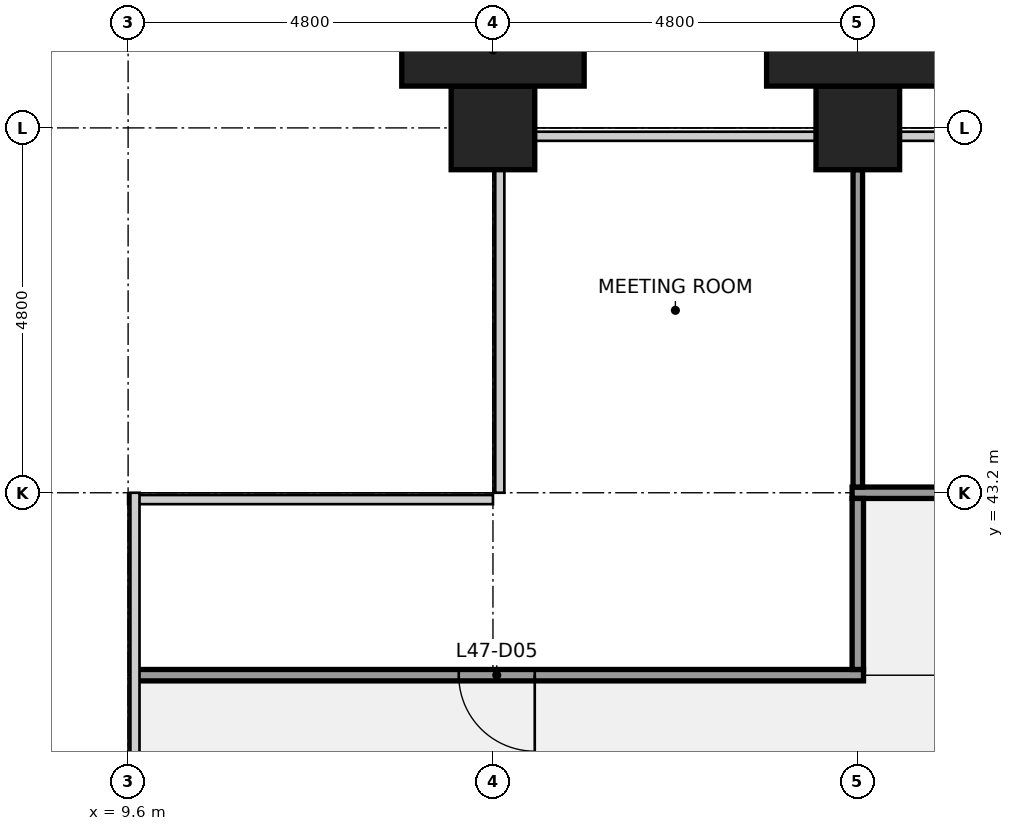
"""IFC4 building model, lengths in metres.
Left out: names, types, materials, properties, quantities, classifications, styles, units other than length and angle.
Written with IfcOpenShell. Run it as: python <this file> out.ifc"""

import sys

from ifc_helpers import new_model, si_unit, direction, frame, frame_2d, origin, origin_2d, place, context, subcontext, project, spatial, rectangle, extrude, element, fill, save


model = new_model("IFC4")
c1 = context("Model", 3, precision=1e-05, world=origin(), true_north=direction((0.0, 1.0)))
c2 = subcontext(c1, "Body", "Model", "MODEL_VIEW")
j1 = project(units=[si_unit("LENGTHUNIT", "METRE"), si_unit("PLANEANGLEUNIT", "RADIAN")], contexts=[c1])
p1 = place(None, origin())
s1 = spatial("IfcSite", under=j1, at=p1, CompositionType="ELEMENT")
p2 = place(p1, origin())
s2 = spatial("IfcBuilding", under=s1, at=p2, CompositionType="ELEMENT")
p3 = place(p2, frame((0.0, 0.0, 217.2)))
s3 = spatial("IfcBuildingStorey", under=s2, at=p3, CompositionType="ELEMENT", Elevation=217.2)
for number, where, z_axis, x_axis in (
    (1, (14.4, 48.0, 0.0), (0.0, 0.0, 1.0), (1.0, 0.0, 0.0)),
    (2, (19.2, 48.0, 0.0), (0.0, 0.0, 1.0), (1.0, 0.0, 0.0)),
):
    element("IfcColumn", number, at=place(p3, frame(where, z_axis=z_axis, x_axis=x_axis)), inside=s3, PredefinedType="COLUMN", context=c2, shape_type="SweptSolid", body=[
        extrude(rectangle(XDim=1.1, YDim=1.1, at=origin_2d()), origin(), (0.0, 0.0, 1.0), 4.0),
    ])
p4 = place(p3, frame((9.7, 40.8, 0.0), z_axis=(0.0, 0.0, 1.0), x_axis=(1.0, 0.0, 0.0)))
e3 = element("IfcWall", 3, at=p4, inside=s3, PredefinedType="PARTITIONING", context=c2, shape_type="SweptSolid", body=[
    extrude(rectangle(XDim=9.575, YDim=0.15, at=frame_2d((4.788, 0.0))), origin(), (0.0, 0.0, 1.0), 2.849),
])
p5 = place(p4, frame((4.25, 0.0, 0.0)))
e4 = element("IfcOpeningElement", 4, at=p5, cuts=e3, PredefinedType="OPENING", context=c2, shape_type="SweptSolid", body=[
    extrude(rectangle(XDim=1.0, YDim=2.1, at=frame_2d((0.5, 1.05))), frame((0.0, 0.085, 0.0), z_axis=(0.0, -1.0, 0.0), x_axis=(1.0, 0.0, 0.0)), (0.0, 0.0, 1.0), 0.17),
])
p6 = place(p3, frame((19.125, 43.2, 0.0), z_axis=(0.0, 0.0, 1.0), x_axis=(1.0, 0.0, 0.0)))
e5 = element("IfcWall", 5, at=p6, inside=s3, PredefinedType="PARTITIONING", context=c2, shape_type="SweptSolid", body=[
    extrude(rectangle(XDim=19.35, YDim=0.15, at=frame_2d((9.675, 0.0))), origin(), (0.0, 0.0, 1.0), 2.849),
])
p7 = place(p6, frame((4.375, 0.0, 0.0)))
e6 = element("IfcOpeningElement", 6, at=p7, cuts=e5, PredefinedType="OPENING", context=c2, shape_type="SweptSolid", body=[
    extrude(rectangle(XDim=1.0, YDim=2.1, at=frame_2d((0.5, 1.05))), frame((0.0, 0.085, 0.0), z_axis=(0.0, -1.0, 0.0), x_axis=(1.0, 0.0, 0.0)), (0.0, 0.0, 1.0), 0.17),
])
p8 = place(p6, frame((13.975, 0.0, 0.0)))
e7 = element("IfcOpeningElement", 7, at=p8, cuts=e5, PredefinedType="OPENING", context=c2, shape_type="SweptSolid", body=[
    extrude(rectangle(XDim=1.0, YDim=2.1, at=frame_2d((0.5, 1.05))), frame((0.0, 0.085, 0.0), z_axis=(0.0, -1.0, 0.0), x_axis=(1.0, 0.0, 0.0)), (0.0, 0.0, 1.0), 0.17),
])
p9 = place(p3, frame((19.2, 43.275, 0.0), z_axis=(0.0, 0.0, 1.0), x_axis=(0.0, 1.0, 0.0)))
e8 = element("IfcWall", 8, at=p9, inside=s3, PredefinedType="PARTITIONING", context=c2, shape_type="SweptSolid", body=[
    extrude(rectangle(XDim=4.175, YDim=0.125, at=frame_2d((2.087, 0.0))), origin(), (0.0, 0.0, 1.0), 2.849),
])
p10 = place(p3, frame((19.2, 40.875, 0.0), z_axis=(0.0, 0.0, 1.0), x_axis=(0.0, 1.0, 0.0)))
e9 = element("IfcWall", 9, at=p10, inside=s3, PredefinedType="PARTITIONING", context=c2, shape_type="SweptSolid", body=[
    extrude(rectangle(XDim=2.25, YDim=0.15, at=frame_2d((1.125, 0.0))), origin(), (0.0, 0.0, 1.0), 2.849),
])
for number, where, z_axis, x_axis in (
    (10, (14.4, 49.025, 0.0), (0.0, 0.0, 1.0), (1.0, 0.0, 0.0)),
    (11, (19.2, 49.025, 0.0), (0.0, 0.0, 1.0), (1.0, 0.0, 0.0)),
):
    element("IfcColumn", number, at=place(p3, frame(where, z_axis=z_axis, x_axis=x_axis)), inside=s3, PredefinedType="PILASTER", context=c2, shape_type="SweptSolid", body=[
        extrude(rectangle(XDim=2.4, YDim=0.95, at=origin_2d()), origin(), (0.0, 0.0, 1.0), 4.0),
    ])
p11 = place(p5, origin())
e12 = element("IfcDoor", 12, at=p11, inside=s3, OperationType="SINGLE_SWING_RIGHT", PredefinedType="DOOR", context=c2, shape_type="SweptSolid", body=[
    extrude(rectangle(XDim=1.0, YDim=2.1, at=frame_2d((0.5, 1.05))), frame((0.0, 0.025, 0.0), z_axis=(0.0, -1.0, 0.0), x_axis=(1.0, 0.0, 0.0)), (0.0, 0.0, 1.0), 0.05),
])
fill(e4, e12)
save(model, sys.argv[1])
